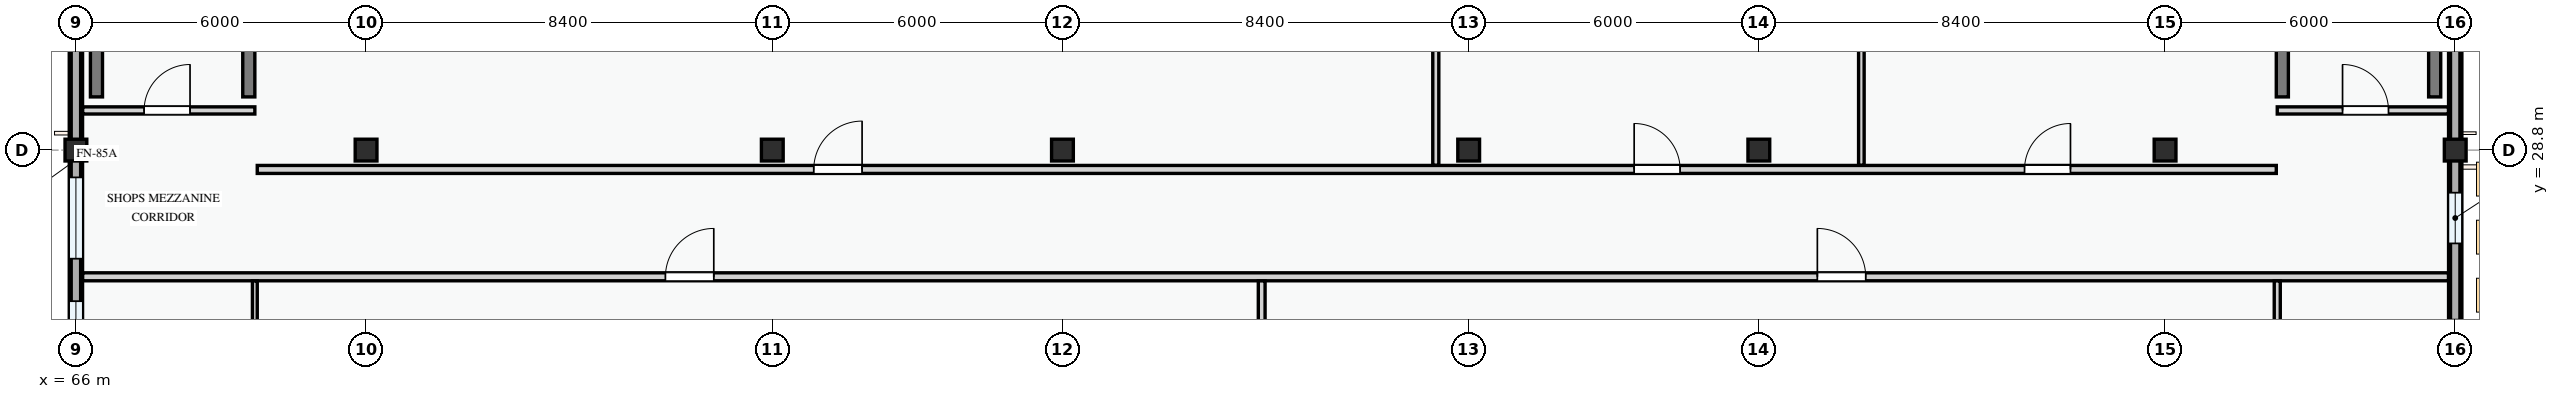
"""IFC4 building model, lengths in metres.
Left out: names, types, materials, properties, quantities, classifications, styles, units other than length and angle.
Written with IfcOpenShell. Run it as: python <this file> out.ifc"""

import sys

from ifc_helpers import new_model, si_unit, direction, frame, frame_2d, origin, origin_2d, place, context, subcontext, project, spatial, rectangle, extrude, element, fill, save


model = new_model("IFC4")
c1 = context("Model", 3, precision=1e-05, world=origin(), true_north=direction((0.0, 1.0)))
c2 = subcontext(c1, "Body", "Model", "MODEL_VIEW")
j1 = project(units=[si_unit("LENGTHUNIT", "METRE"), si_unit("PLANEANGLEUNIT", "RADIAN")], contexts=[c1])
p1 = place(None, origin())
s1 = spatial("IfcSite", under=j1, at=p1, CompositionType="ELEMENT")
p2 = place(p1, origin())
s2 = spatial("IfcBuilding", under=s1, at=p2, CompositionType="ELEMENT")
p3 = place(p2, frame((0.0, 0.0, 4.5)))
s3 = spatial("IfcBuildingStorey", under=s2, at=p3, CompositionType="ELEMENT", Elevation=4.5)
for number, where, z_axis, x_axis in (
    (1, (66.0, 28.8, 0.0), (0.0, 0.0, 1.0), (1.0, 0.0, 0.0)),
    (2, (72.0, 28.8, 0.0), (0.0, 0.0, 1.0), (1.0, 0.0, 0.0)),
    (3, (80.4, 28.8, 0.0), (0.0, 0.0, 1.0), (1.0, 0.0, 0.0)),
    (4, (86.4, 28.8, 0.0), (0.0, 0.0, 1.0), (1.0, 0.0, 0.0)),
    (5, (94.8, 28.8, 0.0), (0.0, 0.0, 1.0), (1.0, 0.0, 0.0)),
    (6, (100.8, 28.8, 0.0), (0.0, 0.0, 1.0), (1.0, 0.0, 0.0)),
    (7, (109.2, 28.8, 0.0), (0.0, 0.0, 1.0), (1.0, 0.0, 0.0)),
    (8, (115.2, 28.8, 0.0), (0.0, 0.0, 1.0), (1.0, 0.0, 0.0)),
):
    element("IfcColumn", number, at=place(p3, frame(where, z_axis=z_axis, x_axis=x_axis)), inside=s3, PredefinedType="COLUMN", context=c2, shape_type="SweptSolid", body=[
        extrude(rectangle(XDim=0.45, YDim=0.45, at=origin_2d()), origin(), (0.0, 0.0, 1.0), 3.6),
    ])
p4 = place(p3, frame((115.2, 22.8, 0.0), z_axis=(0.0, 0.0, 1.0), x_axis=(0.0, 1.0, 0.0)))
e9 = element("IfcWall", 9, at=p4, inside=s3, PredefinedType="STANDARD", context=c2, shape_type="SweptSolid", body=[
    extrude(rectangle(XDim=6.0, YDim=0.275, at=frame_2d((3.0, 0.0))), origin(), (0.0, 0.0, 1.0), 2.875),
])
p5 = place(p4, frame((1.075, 0.0, 0.8)))
e10 = element("IfcOpeningElement", 10, at=p5, cuts=e9, PredefinedType="OPENING", context=c2, shape_type="SweptSolid", body=[
    extrude(rectangle(XDim=1.42, YDim=1.38, at=frame_2d((0.71, 0.69))), frame((0.0, 0.147, 0.0), z_axis=(0.0, -1.0, 0.0), x_axis=(1.0, 0.0, 0.0)), (0.0, 0.0, 1.0), 0.295),
])
p6 = place(p4, frame((4.07, 0.0, 0.8)))
e11 = element("IfcOpeningElement", 11, at=p6, cuts=e9, PredefinedType="OPENING", context=c2, shape_type="SweptSolid", body=[
    extrude(rectangle(XDim=1.05, YDim=1.2, at=frame_2d((0.525, 0.6))), frame((0.0, 0.147, 0.0), z_axis=(0.0, -1.0, 0.0), x_axis=(1.0, 0.0, 0.0)), (0.0, 0.0, 1.0), 0.295),
])
p7 = place(p3, frame((115.2, 28.8, 0.0), z_axis=(0.0, 0.0, 1.0), x_axis=(0.0, 1.0, 0.0)))
e12 = element("IfcWall", 12, at=p7, inside=s3, PredefinedType="STANDARD", context=c2, shape_type="SweptSolid", body=[
    extrude(rectangle(XDim=8.4, YDim=0.275, at=frame_2d((4.2, 0.0))), origin(), (0.0, 0.0, 1.0), 2.725),
])
p8 = place(p7, frame((3.625, 0.0, 0.8)))
e13 = element("IfcOpeningElement", 13, at=p8, cuts=e12, PredefinedType="OPENING", context=c2, shape_type="SweptSolid", body=[
    extrude(rectangle(XDim=1.78, YDim=1.42, at=frame_2d((0.89, 0.71))), frame((0.0, 0.147, 0.0), z_axis=(0.0, -1.0, 0.0), x_axis=(1.0, 0.0, 0.0)), (0.0, 0.0, 1.0), 0.295),
])
p9 = place(p3, frame((66.0, 37.2, 0.0), z_axis=(0.0, 0.0, 1.0), x_axis=(0.0, -1.0, 0.0)))
e14 = element("IfcWall", 14, at=p9, inside=s3, PredefinedType="STANDARD", context=c2, shape_type="SweptSolid", body=[
    extrude(rectangle(XDim=8.4, YDim=0.275, at=frame_2d((4.2, 0.0))), origin(), (0.0, 0.0, 1.0), 2.725),
])
p10 = place(p9, frame((2.645, 0.0, 0.8)))
e15 = element("IfcOpeningElement", 15, at=p10, cuts=e14, PredefinedType="OPENING", context=c2, shape_type="SweptSolid", body=[
    extrude(rectangle(XDim=2.48, YDim=1.46, at=frame_2d((1.24, 0.73))), frame((0.0, 0.147, 0.0), z_axis=(0.0, -1.0, 0.0), x_axis=(1.0, 0.0, 0.0)), (0.0, 0.0, 1.0), 0.295),
])
p11 = place(p3, frame((66.0, 28.8, 0.0), z_axis=(0.0, 0.0, 1.0), x_axis=(0.0, -1.0, 0.0)))
e16 = element("IfcWall", 16, at=p11, inside=s3, PredefinedType="STANDARD", context=c2, shape_type="SweptSolid", body=[
    extrude(rectangle(XDim=6.0, YDim=0.275, at=frame_2d((3.0, 0.0))), origin(), (0.0, 0.0, 1.0), 2.875),
])
p12 = place(p11, frame((0.565, 0.0, 0.8)))
e17 = element("IfcOpeningElement", 17, at=p12, cuts=e16, PredefinedType="OPENING", context=c2, shape_type="SweptSolid", body=[
    extrude(rectangle(XDim=1.68, YDim=1.46, at=frame_2d((0.84, 0.73))), frame((0.0, 0.147, 0.0), z_axis=(0.0, -1.0, 0.0), x_axis=(1.0, 0.0, 0.0)), (0.0, 0.0, 1.0), 0.295),
])
p13 = place(p11, frame((3.125, 0.0, 0.8)))
e18 = element("IfcOpeningElement", 18, at=p13, cuts=e16, PredefinedType="OPENING", context=c2, shape_type="SweptSolid", body=[
    extrude(rectangle(XDim=2.18, YDim=1.48, at=frame_2d((1.09, 0.74))), frame((0.0, 0.147, 0.0), z_axis=(0.0, -1.0, 0.0), x_axis=(1.0, 0.0, 0.0)), (0.0, 0.0, 1.0), 0.295),
])
for number, where, z_axis, x_axis in (
    (19, (115.2, 22.8, 3.6), (0.0, 0.0, 1.0), (0.0, 1.0, 0.0)),
    (20, (66.0, 37.2, 3.6), (0.0, 0.0, 1.0), (0.0, -1.0, 0.0)),
):
    element("IfcWall", number, at=place(p3, frame(where, z_axis=z_axis, x_axis=x_axis)), inside=s3, PredefinedType="PARAPET", context=c2, shape_type="SweptSolid", body=[
        extrude(rectangle(XDim=14.4, YDim=0.195, at=frame_2d((7.2, 0.0))), origin(), (0.0, 0.0, 1.0), 1.15),
    ])
for number, where, z_axis, x_axis in (
    (21, (69.575, 29.9, 0.0), (0.0, 0.0, 1.0), (0.0, 1.0, 0.0)),
    (22, (66.425, 29.9, 0.0), (0.0, 0.0, 1.0), (0.0, 1.0, 0.0)),
    (23, (114.775, 29.9, 0.0), (0.0, 0.0, 1.0), (0.0, 1.0, 0.0)),
    (24, (111.625, 29.9, 0.0), (0.0, 0.0, 1.0), (0.0, 1.0, 0.0)),
):
    element("IfcWall", number, at=place(p3, frame(where, z_axis=z_axis, x_axis=x_axis)), inside=s3, PredefinedType="SHEAR", context=c2, shape_type="SweptSolid", body=[
        extrude(rectangle(XDim=6.7, YDim=0.25, at=frame_2d((3.35, 0.0))), origin(), (0.0, 0.0, 1.0), 3.3),
    ])
p14 = place(p3, frame((66.139, 26.18, 0.0), z_axis=(0.0, 0.0, 1.0), x_axis=(1.0, 0.0, 0.0)))
e25 = element("IfcWall", 25, at=p14, inside=s3, PredefinedType="PARTITIONING", context=c2, shape_type="SweptSolid", body=[
    extrude(rectangle(XDim=48.921, YDim=0.165, at=frame_2d((24.46, 0.0))), origin(), (0.0, 0.0, 1.0), 3.3),
])
p15 = place(p14, frame((12.051, 0.0, 0.0)))
e26 = element("IfcOpeningElement", 26, at=p15, cuts=e25, PredefinedType="OPENING", context=c2, shape_type="SweptSolid", body=[
    extrude(rectangle(XDim=1.0, YDim=2.1, at=frame_2d((0.5, 1.05))), frame((0.0, 0.093, 0.0), z_axis=(0.0, -1.0, 0.0), x_axis=(1.0, 0.0, 0.0)), (0.0, 0.0, 1.0), 0.185),
])
p16 = place(p14, frame((35.871, 0.0, 0.0)))
e27 = element("IfcOpeningElement", 27, at=p16, cuts=e25, PredefinedType="OPENING", context=c2, shape_type="SweptSolid", body=[
    extrude(rectangle(XDim=1.0, YDim=2.1, at=frame_2d((0.5, 1.05))), frame((0.0, 0.093, 0.0), z_axis=(0.0, -1.0, 0.0), x_axis=(1.0, 0.0, 0.0)), (0.0, 0.0, 1.0), 0.185),
])
p17 = place(p3, frame((94.12, 28.485, 0.0), z_axis=(0.0, 0.0, 1.0), x_axis=(0.0, 1.0, 0.0)))
e28 = element("IfcWall", 28, at=p17, inside=s3, PredefinedType="PARTITIONING", context=c2, shape_type="SweptSolid", body=[
    extrude(rectangle(XDim=8.576, YDim=0.125, at=frame_2d((4.288, 0.0))), origin(), (0.0, 0.0, 1.0), 3.3),
])
p18 = place(p3, frame((102.92, 28.485, 0.0), z_axis=(0.0, 0.0, 1.0), x_axis=(0.0, 1.0, 0.0)))
e29 = element("IfcWall", 29, at=p18, inside=s3, PredefinedType="PARTITIONING", context=c2, shape_type="SweptSolid", body=[
    extrude(rectangle(XDim=8.576, YDim=0.115, at=frame_2d((4.288, 0.0))), origin(), (0.0, 0.0, 1.0), 3.3),
])
p19 = place(p3, frame((66.139, 29.62, 0.0), z_axis=(0.0, 0.0, 1.0), x_axis=(1.0, 0.0, 0.0)))
e30 = element("IfcWall", 30, at=p19, inside=s3, PredefinedType="PARTITIONING", context=c2, shape_type="SweptSolid", body=[
    extrude(rectangle(XDim=3.561, YDim=0.148, at=frame_2d((1.78, 0.0))), origin(), (0.0, 0.0, 1.0), 3.3),
])
p20 = place(p19, frame((1.271, 0.0, 0.0)))
e31 = element("IfcOpeningElement", 31, at=p20, cuts=e30, PredefinedType="OPENING", context=c2, shape_type="SweptSolid", body=[
    extrude(rectangle(XDim=0.95, YDim=2.1, at=frame_2d((0.475, 1.05))), frame((0.0, 0.084, 0.0), z_axis=(0.0, -1.0, 0.0), x_axis=(1.0, 0.0, 0.0)), (0.0, 0.0, 1.0), 0.168),
])
p21 = place(p3, frame((111.52, 29.62, 0.0), z_axis=(0.0, 0.0, 1.0), x_axis=(1.0, 0.0, 0.0)))
e32 = element("IfcWall", 32, at=p21, inside=s3, PredefinedType="PARTITIONING", context=c2, shape_type="SweptSolid", body=[
    extrude(rectangle(XDim=3.541, YDim=0.148, at=frame_2d((1.77, 0.0))), origin(), (0.0, 0.0, 1.0), 3.3),
])
p22 = place(p21, frame((1.35, 0.0, 0.0)))
e33 = element("IfcOpeningElement", 33, at=p22, cuts=e32, PredefinedType="OPENING", context=c2, shape_type="SweptSolid", body=[
    extrude(rectangle(XDim=0.95, YDim=2.1, at=frame_2d((0.475, 1.05))), frame((0.0, 0.084, 0.0), z_axis=(0.0, -1.0, 0.0), x_axis=(1.0, 0.0, 0.0)), (0.0, 0.0, 1.0), 0.168),
])
p23 = place(p3, frame((69.7, 22.939, 0.0), z_axis=(0.0, 0.0, 1.0), x_axis=(0.0, 1.0, 0.0)))
e34 = element("IfcWall", 34, at=p23, inside=s3, PredefinedType="PARTITIONING", context=c2, shape_type="SweptSolid", body=[
    extrude(rectangle(XDim=3.156, YDim=0.1, at=frame_2d((1.578, 0.0))), origin(), (0.0, 0.0, 1.0), 3.3),
])
p24 = place(p3, frame((90.52, 22.939, 0.0), z_axis=(0.0, 0.0, 1.0), x_axis=(0.0, 1.0, 0.0)))
e35 = element("IfcWall", 35, at=p24, inside=s3, PredefinedType="PARTITIONING", context=c2, shape_type="SweptSolid", body=[
    extrude(rectangle(XDim=3.156, YDim=0.14, at=frame_2d((1.578, 0.0))), origin(), (0.0, 0.0, 1.0), 3.3),
])
p25 = place(p3, frame((111.52, 22.939, 0.0), z_axis=(0.0, 0.0, 1.0), x_axis=(0.0, 1.0, 0.0)))
e36 = element("IfcWall", 36, at=p25, inside=s3, PredefinedType="PARTITIONING", context=c2, shape_type="SweptSolid", body=[
    extrude(rectangle(XDim=3.156, YDim=0.125, at=frame_2d((1.578, 0.0))), origin(), (0.0, 0.0, 1.0), 3.3),
])
p26 = place(p3, frame((69.75, 28.4, 0.0), z_axis=(0.0, 0.0, 1.0), x_axis=(1.0, 0.0, 0.0)))
e37 = element("IfcWall", 37, at=p26, inside=s3, PredefinedType="PARTITIONING", context=c2, shape_type="SweptSolid", body=[
    extrude(rectangle(XDim=41.75, YDim=0.165, at=frame_2d((20.875, 0.0))), origin(), (0.0, 0.0, 1.0), 2.675),
])
p27 = place(p26, frame((11.507, 0.0, 0.0)))
e38 = element("IfcOpeningElement", 38, at=p27, cuts=e37, PredefinedType="OPENING", context=c2, shape_type="SweptSolid", body=[
    extrude(rectangle(XDim=1.0, YDim=2.1, at=frame_2d((0.5, 1.05))), frame((0.0, 0.093, 0.0), z_axis=(0.0, -1.0, 0.0), x_axis=(1.0, 0.0, 0.0)), (0.0, 0.0, 1.0), 0.185),
])
p28 = place(p26, frame((28.472, 0.0, 0.0)))
e39 = element("IfcOpeningElement", 39, at=p28, cuts=e37, PredefinedType="OPENING", context=c2, shape_type="SweptSolid", body=[
    extrude(rectangle(XDim=0.95, YDim=2.1, at=frame_2d((0.475, 1.05))), frame((0.0, 0.093, 0.0), z_axis=(0.0, -1.0, 0.0), x_axis=(1.0, 0.0, 0.0)), (0.0, 0.0, 1.0), 0.185),
])
p29 = place(p26, frame((36.544, 0.0, 0.0)))
e40 = element("IfcOpeningElement", 40, at=p29, cuts=e37, PredefinedType="OPENING", context=c2, shape_type="SweptSolid", body=[
    extrude(rectangle(XDim=0.95, YDim=2.1, at=frame_2d((0.475, 1.05))), frame((0.0, 0.093, 0.0), z_axis=(0.0, -1.0, 0.0), x_axis=(1.0, 0.0, 0.0)), (0.0, 0.0, 1.0), 0.185),
])
p30 = place(p6, origin())
e41 = element("IfcWindow", 41, at=p30, inside=s3, PartitioningType="SINGLE_PANEL", PredefinedType="WINDOW", context=c2, shape_type="SweptSolid", body=[
    extrude(rectangle(XDim=1.05, YDim=1.2, at=frame_2d((0.525, 0.6))), frame((0.0, 0.03, 0.0), z_axis=(0.0, -1.0, 0.0), x_axis=(1.0, 0.0, 0.0)), (0.0, 0.0, 1.0), 0.06),
])
fill(e11, e41)
p31 = place(p12, origin())
e42 = element("IfcWindow", 42, at=p31, inside=s3, PartitioningType="DOUBLE_PANEL_VERTICAL", PredefinedType="WINDOW", context=c2, shape_type="SweptSolid", body=[
    extrude(rectangle(XDim=1.68, YDim=1.46, at=frame_2d((0.84, 0.73))), frame((0.0, 0.03, 0.0), z_axis=(0.0, -1.0, 0.0), x_axis=(1.0, 0.0, 0.0)), (0.0, 0.0, 1.0), 0.06),
])
fill(e17, e42)
p32 = place(p13, origin())
e43 = element("IfcWindow", 43, at=p32, inside=s3, PartitioningType="DOUBLE_PANEL_VERTICAL", PredefinedType="WINDOW", context=c2, shape_type="SweptSolid", body=[
    extrude(rectangle(XDim=2.18, YDim=1.48, at=frame_2d((1.09, 0.74))), frame((0.0, 0.03, 0.0), z_axis=(0.0, -1.0, 0.0), x_axis=(1.0, 0.0, 0.0)), (0.0, 0.0, 1.0), 0.06),
])
fill(e18, e43)
p33 = place(p15, origin())
e44 = element("IfcDoor", 44, at=p33, inside=s3, OperationType="SINGLE_SWING_RIGHT", PredefinedType="DOOR", context=c2, shape_type="SweptSolid", body=[
    extrude(rectangle(XDim=1.0, YDim=2.1, at=frame_2d((0.5, 1.05))), frame((0.0, 0.025, 0.0), z_axis=(0.0, -1.0, 0.0), x_axis=(1.0, 0.0, 0.0)), (0.0, 0.0, 1.0), 0.05),
])
fill(e26, e44)
p34 = place(p16, origin())
e45 = element("IfcDoor", 45, at=p34, inside=s3, OperationType="SINGLE_SWING_LEFT", PredefinedType="DOOR", context=c2, shape_type="SweptSolid", body=[
    extrude(rectangle(XDim=1.0, YDim=2.1, at=frame_2d((0.5, 1.05))), frame((0.0, 0.025, 0.0), z_axis=(0.0, -1.0, 0.0), x_axis=(1.0, 0.0, 0.0)), (0.0, 0.0, 1.0), 0.05),
])
fill(e27, e45)
p35 = place(p20, origin())
e46 = element("IfcDoor", 46, at=p35, inside=s3, OperationType="SINGLE_SWING_RIGHT", PredefinedType="DOOR", context=c2, shape_type="SweptSolid", body=[
    extrude(rectangle(XDim=0.95, YDim=2.1, at=frame_2d((0.475, 1.05))), frame((0.0, 0.025, 0.0), z_axis=(0.0, -1.0, 0.0), x_axis=(1.0, 0.0, 0.0)), (0.0, 0.0, 1.0), 0.05),
])
fill(e31, e46)
p36 = place(p22, origin())
e47 = element("IfcDoor", 47, at=p36, inside=s3, OperationType="SINGLE_SWING_LEFT", PredefinedType="DOOR", context=c2, shape_type="SweptSolid", body=[
    extrude(rectangle(XDim=0.95, YDim=2.1, at=frame_2d((0.475, 1.05))), frame((0.0, 0.025, 0.0), z_axis=(0.0, -1.0, 0.0), x_axis=(1.0, 0.0, 0.0)), (0.0, 0.0, 1.0), 0.05),
])
fill(e33, e47)
p37 = place(p27, origin())
e48 = element("IfcDoor", 48, at=p37, inside=s3, OperationType="SINGLE_SWING_RIGHT", PredefinedType="DOOR", context=c2, shape_type="SweptSolid", body=[
    extrude(rectangle(XDim=1.0, YDim=2.1, at=frame_2d((0.5, 1.05))), frame((0.0, 0.025, 0.0), z_axis=(0.0, -1.0, 0.0), x_axis=(1.0, 0.0, 0.0)), (0.0, 0.0, 1.0), 0.05),
])
fill(e38, e48)
p38 = place(p28, origin())
e49 = element("IfcDoor", 49, at=p38, inside=s3, OperationType="SINGLE_SWING_LEFT", PredefinedType="DOOR", context=c2, shape_type="SweptSolid", body=[
    extrude(rectangle(XDim=0.95, YDim=2.1, at=frame_2d((0.475, 1.05))), frame((0.0, 0.025, 0.0), z_axis=(0.0, -1.0, 0.0), x_axis=(1.0, 0.0, 0.0)), (0.0, 0.0, 1.0), 0.05),
])
fill(e39, e49)
p39 = place(p29, origin())
e50 = element("IfcDoor", 50, at=p39, inside=s3, OperationType="SINGLE_SWING_RIGHT", PredefinedType="DOOR", context=c2, shape_type="SweptSolid", body=[
    extrude(rectangle(XDim=0.95, YDim=2.1, at=frame_2d((0.475, 1.05))), frame((0.0, 0.025, 0.0), z_axis=(0.0, -1.0, 0.0), x_axis=(1.0, 0.0, 0.0)), (0.0, 0.0, 1.0), 0.05),
])
fill(e40, e50)
save(model, sys.argv[1])
